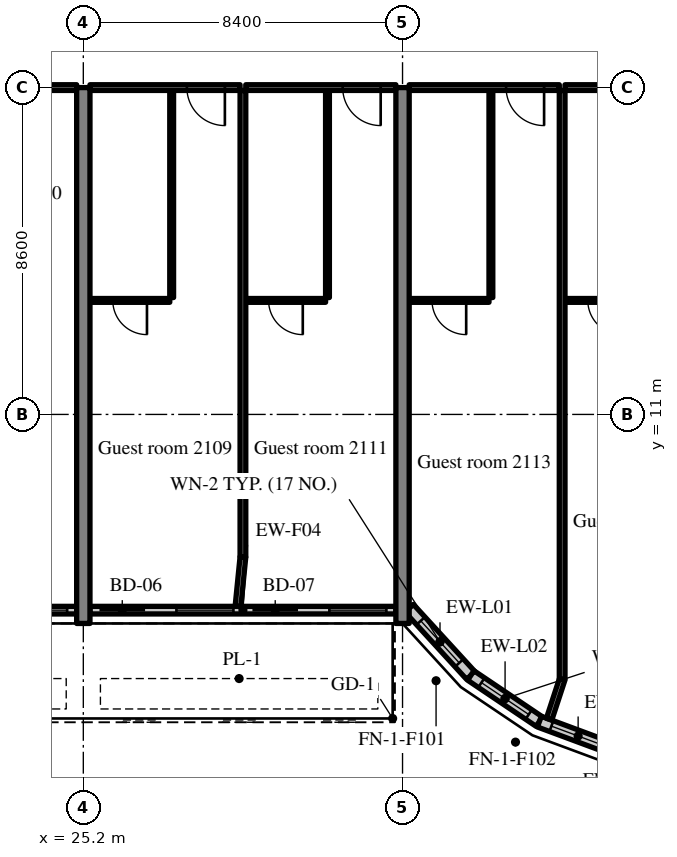
"""IFC4 building model, lengths in metres.
Left out: names, types, materials, properties, quantities, classifications, styles, units other than length and angle.
Written with IfcOpenShell. Run it as: python <this file> out.ifc"""

import sys

from ifc_helpers import new_model, si_unit, direction, frame, frame_2d, origin, place, context, subcontext, project, spatial, rectangle, extrude, source, transform, mapped, element, fill, save


model = new_model("IFC4")
c1 = context("Model", 3, precision=1e-05, world=origin(), true_north=direction((0.0, 1.0)))
c2 = subcontext(c1, "Body", "Model", "MODEL_VIEW")
j1 = project(units=[si_unit("LENGTHUNIT", "METRE"), si_unit("PLANEANGLEUNIT", "RADIAN")], contexts=[c1])
p1 = place(None, origin())
s1 = spatial("IfcSite", under=j1, at=p1, CompositionType="ELEMENT")
p2 = place(p1, origin())
s2 = spatial("IfcBuilding", under=s1, at=p2, CompositionType="ELEMENT")
p3 = place(p2, frame((0.0, 0.0, 91.4)))
s3 = spatial("IfcBuildingStorey", under=s2, at=p3, CompositionType="ELEMENT", Elevation=91.4)
m1 = source(origin(), c2, "Body", "SweptSolid", [
    extrude(rectangle(XDim=14.1, YDim=0.35, at=frame_2d((7.05, 0.0))), origin(), (0.0, 0.0, 1.0), 3.52),
])
for number, where, z_axis, x_axis in (
    (1, (25.2, 5.5, 0.0), (0.0, 0.0, 1.0), (0.0, 1.0, 0.0)),
    (2, (33.6, 5.5, 0.0), (0.0, 0.0, 1.0), (0.0, 1.0, 0.0)),
):
    element("IfcWall", number, at=place(p3, frame(where, z_axis=z_axis, x_axis=x_axis)), inside=s3, PredefinedType="SHEAR", context=c2, shape_type="MappedRepresentation", body=[
        mapped(m1, transform((0.0, 0.0, 0.0), scale=1.0)),
    ])
m2 = source(origin(), c2, "Body", "SweptSolid", [
    extrude(rectangle(XDim=8.05, YDim=0.2, at=frame_2d((4.025, 0.0))), origin(), (0.0, 0.0, 1.0), 2.82),
])
p4 = place(p3, frame((16.975, 5.85, 0.0), z_axis=(0.0, 0.0, 1.0), x_axis=(1.0, 0.0, 0.0)))
e3 = element("IfcWall", 3, at=p4, inside=s3, PredefinedType="SOLIDWALL", context=c2, shape_type="MappedRepresentation", body=[
    mapped(m2, transform((0.0, 0.0, 0.0), scale=1.0)),
])
m3 = source(origin(), c2, "Body", "SweptSolid", [
    extrude(rectangle(XDim=1.2, YDim=2.4, at=frame_2d((0.6, 1.2))), frame((0.0, 0.11, 0.0), z_axis=(0.0, -1.0, 0.0), x_axis=(1.0, 0.0, 0.0)), (0.0, 0.0, 1.0), 0.22),
])
p5 = place(p4, frame((0.25, 0.0, 0.0)))
e4 = element("IfcOpeningElement", 4, at=p5, cuts=e3, PredefinedType="OPENING", context=c2, shape_type="MappedRepresentation", body=[
    mapped(m3, transform((0.0, 0.0, 0.0), scale=1.0)),
])
m4 = source(origin(), c2, "Body", "SweptSolid", [
    extrude(rectangle(XDim=1.5, YDim=1.5, at=frame_2d((0.75, 0.75))), frame((0.0, 0.11, 0.0), z_axis=(0.0, -1.0, 0.0), x_axis=(1.0, 0.0, 0.0)), (0.0, 0.0, 1.0), 0.22),
])
p6 = place(p4, frame((2.275, 0.0, 0.9)))
e5 = element("IfcOpeningElement", 5, at=p6, cuts=e3, PredefinedType="OPENING", context=c2, shape_type="MappedRepresentation", body=[
    mapped(m4, transform((0.0, 0.0, 0.0), scale=1.0)),
])
p7 = place(p4, frame((4.275, 0.0, 0.0)))
e6 = element("IfcOpeningElement", 6, at=p7, cuts=e3, PredefinedType="OPENING", context=c2, shape_type="MappedRepresentation", body=[
    mapped(m3, transform((0.0, 0.0, 0.0), scale=1.0)),
])
p8 = place(p4, frame((6.3, 0.0, 0.9)))
e7 = element("IfcOpeningElement", 7, at=p8, cuts=e3, PredefinedType="OPENING", context=c2, shape_type="MappedRepresentation", body=[
    mapped(m4, transform((0.0, 0.0, 0.0), scale=1.0)),
])
m5 = source(origin(), c2, "Body", "SweptSolid", [
    extrude(rectangle(XDim=8.05, YDim=0.2, at=frame_2d((4.025, 0.0))), origin(), (0.0, 0.0, 1.0), 2.82),
])
p9 = place(p3, frame((25.375, 5.85, 0.0), z_axis=(0.0, 0.0, 1.0), x_axis=(1.0, 0.0, 0.0)))
e8 = element("IfcWall", 8, at=p9, inside=s3, PredefinedType="SOLIDWALL", context=c2, shape_type="MappedRepresentation", body=[
    mapped(m5, transform((0.0, 0.0, 0.0), scale=1.0)),
])
p10 = place(p9, frame((0.25, 0.0, 0.0)))
e9 = element("IfcOpeningElement", 9, at=p10, cuts=e8, PredefinedType="OPENING", context=c2, shape_type="MappedRepresentation", body=[
    mapped(m3, transform((0.0, 0.0, 0.0), scale=1.0)),
])
p11 = place(p9, frame((2.275, 0.0, 0.9)))
e10 = element("IfcOpeningElement", 10, at=p11, cuts=e8, PredefinedType="OPENING", context=c2, shape_type="MappedRepresentation", body=[
    mapped(m4, transform((0.0, 0.0, 0.0), scale=1.0)),
])
p12 = place(p9, frame((4.275, 0.0, 0.0)))
e11 = element("IfcOpeningElement", 11, at=p12, cuts=e8, PredefinedType="OPENING", context=c2, shape_type="MappedRepresentation", body=[
    mapped(m3, transform((0.0, 0.0, 0.0), scale=1.0)),
])
p13 = place(p9, frame((6.3, 0.0, 0.9)))
e12 = element("IfcOpeningElement", 12, at=p13, cuts=e8, PredefinedType="OPENING", context=c2, shape_type="MappedRepresentation", body=[
    mapped(m4, transform((0.0, 0.0, 0.0), scale=1.0)),
])
m6 = source(origin(), c2, "Body", "SweptSolid", [
    extrude(rectangle(XDim=2.398, YDim=0.3, at=frame_2d((1.199, 0.0))), origin(), (0.0, 0.0, 1.0), 3.52),
])
p14 = place(p3, frame((33.776, 5.9, 0.0), z_axis=(0.0, 0.0, 1.0), x_axis=(0.675374189419, -0.737475222815, 0.0)))
e13 = element("IfcWall", 13, at=p14, inside=s3, PredefinedType="SOLIDWALL", context=c2, shape_type="MappedRepresentation", body=[
    mapped(m6, transform((0.0, 0.0, 0.0), scale=1.0)),
])
m7 = source(origin(), c2, "Body", "SweptSolid", [
    extrude(rectangle(XDim=1.5, YDim=2.0, at=frame_2d((0.75, 1.0))), frame((0.0, 0.16, 0.0), z_axis=(0.0, -1.0, 0.0), x_axis=(1.0, 0.0, 0.0)), (0.0, 0.0, 1.0), 0.32),
])
p15 = place(p14, frame((0.449, 0.0, 0.9)))
e14 = element("IfcOpeningElement", 14, at=p15, cuts=e13, PredefinedType="OPENING", context=c2, shape_type="MappedRepresentation", body=[
    mapped(m7, transform((0.0, 0.0, 0.0), scale=1.0)),
])
m8 = source(origin(), c2, "Body", "SweptSolid", [
    extrude(rectangle(XDim=2.176, YDim=0.3, at=frame_2d((1.088, 0.0))), origin(), (0.0, 0.0, 1.0), 3.52),
])
p16 = place(p3, frame((35.396, 4.131, 0.0), z_axis=(0.0, 0.0, 1.0), x_axis=(0.829590746428, -0.558371913192, 0.0)))
e15 = element("IfcWall", 15, at=p16, inside=s3, PredefinedType="SOLIDWALL", context=c2, shape_type="MappedRepresentation", body=[
    mapped(m8, transform((0.0, 0.0, 0.0), scale=1.0)),
])
p17 = place(p16, frame((0.338, 0.0, 0.9)))
e16 = element("IfcOpeningElement", 16, at=p17, cuts=e15, PredefinedType="OPENING", context=c2, shape_type="MappedRepresentation", body=[
    mapped(m7, transform((0.0, 0.0, 0.0), scale=1.0)),
])
p18 = place(p3, frame((37.201, 2.917, 0.0), z_axis=(0.0, 0.0, 1.0), x_axis=(0.93754555999, -0.347862505801, 0.0)))
e17 = element("IfcWall", 17, at=p18, inside=s3, PredefinedType="SOLIDWALL", context=c2, shape_type="MappedRepresentation", body=[
    mapped(m8, transform((0.0, 0.0, 0.0), scale=1.0)),
])
p19 = place(p18, frame((0.338, 0.0, 0.9)))
e18 = element("IfcOpeningElement", 18, at=p19, cuts=e17, PredefinedType="OPENING", context=c2, shape_type="MappedRepresentation", body=[
    mapped(m7, transform((0.0, 0.0, 0.0), scale=1.0)),
])
m9 = source(origin(), c2, "Body", "SweptSolid", [
    extrude(rectangle(XDim=8.05, YDim=0.15, at=frame_2d((4.025, 0.0))), origin(), (0.0, 0.0, 1.0), 2.82),
])
p20 = place(p3, frame((16.975, 19.6, 0.0), z_axis=(0.0, 0.0, 1.0), x_axis=(1.0, 0.0, 0.0)))
e19 = element("IfcWall", 19, at=p20, inside=s3, PredefinedType="PARTITIONING", context=c2, shape_type="MappedRepresentation", body=[
    mapped(m9, transform((0.0, 0.0, 0.0), scale=1.0)),
])
m10 = source(origin(), c2, "Body", "SweptSolid", [
    extrude(rectangle(XDim=1.8, YDim=2.1, at=frame_2d((0.9, 1.05))), frame((0.0, 0.085, 0.0), z_axis=(0.0, -1.0, 0.0), x_axis=(1.0, 0.0, 0.0)), (0.0, 0.0, 1.0), 0.17),
])
p21 = place(p20, frame((3.125, 0.0, 0.0)))
e20 = element("IfcOpeningElement", 20, at=p21, cuts=e19, PredefinedType="OPENING", context=c2, shape_type="MappedRepresentation", body=[
    mapped(m10, transform((0.0, 0.0, 0.0), scale=1.0)),
])
m11 = source(origin(), c2, "Body", "SweptSolid", [
    extrude(rectangle(XDim=5.45, YDim=0.1, at=frame_2d((2.725, 0.0))), origin(), (0.0, 0.0, 1.0), 3.52),
])
p22 = place(p3, frame((27.525, 14.075, 0.0), z_axis=(0.0, 0.0, 1.0), x_axis=(0.0, 1.0, 0.0)))
e21 = element("IfcWall", 21, at=p22, inside=s3, PredefinedType="PARTITIONING", context=c2, shape_type="MappedRepresentation", body=[
    mapped(m11, transform((0.0, 0.0, 0.0), scale=1.0)),
])
m12 = source(origin(), c2, "Body", "SweptSolid", [
    extrude(rectangle(XDim=2.1, YDim=0.1, at=frame_2d((1.05, 0.0))), origin(), (0.0, 0.0, 1.0), 3.52),
])
p23 = place(p3, frame((25.375, 14.0, 0.0), z_axis=(0.0, 0.0, 1.0), x_axis=(1.0, 0.0, 0.0)))
e22 = element("IfcWall", 22, at=p23, inside=s3, PredefinedType="PARTITIONING", context=c2, shape_type="MappedRepresentation", body=[
    mapped(m12, transform((0.0, 0.0, 0.0), scale=1.0)),
])
m13 = source(origin(), c2, "Body", "SweptSolid", [
    extrude(rectangle(XDim=0.9, YDim=2.1, at=frame_2d((0.45, 1.05))), frame((0.0, 0.06, 0.0), z_axis=(0.0, -1.0, 0.0), x_axis=(1.0, 0.0, 0.0)), (0.0, 0.0, 1.0), 0.12),
])
p24 = place(p23, frame((0.6, 0.0, 0.0)))
e23 = element("IfcOpeningElement", 23, at=p24, cuts=e22, PredefinedType="OPENING", context=c2, shape_type="MappedRepresentation", body=[
    mapped(m13, transform((0.0, 0.0, 0.0), scale=1.0)),
])
m14 = source(origin(), c2, "Body", "SweptSolid", [
    extrude(rectangle(XDim=3.95, YDim=0.15, at=frame_2d((1.975, 0.0))), origin(), (0.0, 0.0, 1.0), 2.82),
])
p25 = place(p3, frame((25.375, 19.6, 0.0), z_axis=(0.0, 0.0, 1.0), x_axis=(1.0, 0.0, 0.0)))
e24 = element("IfcWall", 24, at=p25, inside=s3, PredefinedType="PARTITIONING", context=c2, shape_type="MappedRepresentation", body=[
    mapped(m14, transform((0.0, 0.0, 0.0), scale=1.0)),
])
m15 = source(origin(), c2, "Body", "SweptSolid", [
    extrude(rectangle(XDim=1.0, YDim=2.1, at=frame_2d((0.5, 1.05))), frame((0.0, 0.085, 0.0), z_axis=(0.0, -1.0, 0.0), x_axis=(1.0, 0.0, 0.0)), (0.0, 0.0, 1.0), 0.17),
])
p26 = place(p25, frame((2.55, 0.0, 0.0)))
e25 = element("IfcOpeningElement", 25, at=p26, cuts=e24, PredefinedType="OPENING", context=c2, shape_type="MappedRepresentation", body=[
    mapped(m15, transform((0.0, 0.0, 0.0), scale=1.0)),
])
p27 = place(p3, frame((31.625, 14.075, 0.0), z_axis=(0.0, 0.0, 1.0), x_axis=(0.0, 1.0, 0.0)))
e26 = element("IfcWall", 26, at=p27, inside=s3, PredefinedType="PARTITIONING", context=c2, shape_type="MappedRepresentation", body=[
    mapped(m11, transform((0.0, 0.0, 0.0), scale=1.0)),
])
m16 = source(origin(), c2, "Body", "SweptSolid", [
    extrude(rectangle(XDim=2.1, YDim=0.1, at=frame_2d((1.05, 0.0))), origin(), (0.0, 0.0, 1.0), 3.52),
])
p28 = place(p3, frame((29.475, 14.0, 0.0), z_axis=(0.0, 0.0, 1.0), x_axis=(1.0, 0.0, 0.0)))
e27 = element("IfcWall", 27, at=p28, inside=s3, PredefinedType="PARTITIONING", context=c2, shape_type="MappedRepresentation", body=[
    mapped(m16, transform((0.0, 0.0, 0.0), scale=1.0)),
])
p29 = place(p28, frame((0.6, 0.0, 0.0)))
e28 = element("IfcOpeningElement", 28, at=p29, cuts=e27, PredefinedType="OPENING", context=c2, shape_type="MappedRepresentation", body=[
    mapped(m13, transform((0.0, 0.0, 0.0), scale=1.0)),
])
p30 = place(p3, frame((29.475, 19.6, 0.0), z_axis=(0.0, 0.0, 1.0), x_axis=(1.0, 0.0, 0.0)))
e29 = element("IfcWall", 29, at=p30, inside=s3, PredefinedType="PARTITIONING", context=c2, shape_type="MappedRepresentation", body=[
    mapped(m14, transform((0.0, 0.0, 0.0), scale=1.0)),
])
p31 = place(p30, frame((2.55, 0.0, 0.0)))
e30 = element("IfcOpeningElement", 30, at=p31, cuts=e29, PredefinedType="OPENING", context=c2, shape_type="MappedRepresentation", body=[
    mapped(m15, transform((0.0, 0.0, 0.0), scale=1.0)),
])
m17 = source(origin(), c2, "Body", "SweptSolid", [
    extrude(rectangle(XDim=12.275, YDim=0.15, at=frame_2d((6.137, 0.0))), origin(), (0.0, 0.0, 1.0), 3.52),
])
p32 = place(p3, frame((29.4, 7.25, 0.0), z_axis=(0.0, 0.0, 1.0), x_axis=(0.0, 1.0, 0.0)))
e31 = element("IfcWall", 31, at=p32, inside=s3, PredefinedType="PARTITIONING", context=c2, shape_type="MappedRepresentation", body=[
    mapped(m17, transform((0.0, 0.0, 0.0), scale=1.0)),
])
p33 = place(p3, frame((35.925, 14.075, 0.0), z_axis=(0.0, 0.0, 1.0), x_axis=(0.0, 1.0, 0.0)))
e32 = element("IfcWall", 32, at=p33, inside=s3, PredefinedType="PARTITIONING", context=c2, shape_type="MappedRepresentation", body=[
    mapped(m11, transform((0.0, 0.0, 0.0), scale=1.0)),
])
p34 = place(p3, frame((33.775, 14.0, 0.0), z_axis=(0.0, 0.0, 1.0), x_axis=(1.0, 0.0, 0.0)))
e33 = element("IfcWall", 33, at=p34, inside=s3, PredefinedType="PARTITIONING", context=c2, shape_type="MappedRepresentation", body=[
    mapped(m12, transform((0.0, 0.0, 0.0), scale=1.0)),
])
p35 = place(p34, frame((0.6, 0.0, 0.0)))
e34 = element("IfcOpeningElement", 34, at=p35, cuts=e33, PredefinedType="OPENING", context=c2, shape_type="MappedRepresentation", body=[
    mapped(m13, transform((0.0, 0.0, 0.0), scale=1.0)),
])
m18 = source(origin(), c2, "Body", "SweptSolid", [
    extrude(rectangle(XDim=3.95, YDim=0.15, at=frame_2d((1.975, 0.0))), origin(), (0.0, 0.0, 1.0), 2.82),
])
p36 = place(p3, frame((33.775, 19.6, 0.0), z_axis=(0.0, 0.0, 1.0), x_axis=(1.0, 0.0, 0.0)))
e35 = element("IfcWall", 35, at=p36, inside=s3, PredefinedType="PARTITIONING", context=c2, shape_type="MappedRepresentation", body=[
    mapped(m18, transform((0.0, 0.0, 0.0), scale=1.0)),
])
p37 = place(p36, frame((2.55, 0.0, 0.0)))
e36 = element("IfcOpeningElement", 36, at=p37, cuts=e35, PredefinedType="OPENING", context=c2, shape_type="MappedRepresentation", body=[
    mapped(m15, transform((0.0, 0.0, 0.0), scale=1.0)),
])
p38 = place(p3, frame((37.875, 14.0, 0.0), z_axis=(0.0, 0.0, 1.0), x_axis=(1.0, 0.0, 0.0)))
e37 = element("IfcWall", 37, at=p38, inside=s3, PredefinedType="PARTITIONING", context=c2, shape_type="MappedRepresentation", body=[
    mapped(m12, transform((0.0, 0.0, 0.0), scale=1.0)),
])
p39 = place(p38, frame((0.6, 0.0, 0.0)))
e38 = element("IfcOpeningElement", 38, at=p39, cuts=e37, PredefinedType="OPENING", context=c2, shape_type="MappedRepresentation", body=[
    mapped(m13, transform((0.0, 0.0, 0.0), scale=1.0)),
])
p40 = place(p3, frame((37.875, 19.6, 0.0), z_axis=(0.0, 0.0, 1.0), x_axis=(1.0, 0.0, 0.0)))
e39 = element("IfcWall", 39, at=p40, inside=s3, PredefinedType="PARTITIONING", context=c2, shape_type="MappedRepresentation", body=[
    mapped(m14, transform((0.0, 0.0, 0.0), scale=1.0)),
])
p41 = place(p40, frame((2.55, 0.0, 0.0)))
e40 = element("IfcOpeningElement", 40, at=p41, cuts=e39, PredefinedType="OPENING", context=c2, shape_type="MappedRepresentation", body=[
    mapped(m15, transform((0.0, 0.0, 0.0), scale=1.0)),
])
m19 = source(origin(), c2, "Body", "SweptSolid", [
    extrude(rectangle(XDim=15.498, YDim=0.15, at=frame_2d((7.749, 0.0))), origin(), (0.0, 0.0, 1.0), 3.52),
])
p42 = place(p3, frame((37.8, 4.027, 0.0), z_axis=(0.0, 0.0, 1.0), x_axis=(0.0, 1.0, 0.0)))
e41 = element("IfcWall", 41, at=p42, inside=s3, PredefinedType="PARTITIONING", context=c2, shape_type="MappedRepresentation", body=[
    mapped(m19, transform((0.0, 0.0, 0.0), scale=1.0)),
])
m20 = source(origin(), c2, "Body", "SweptSolid", [
    extrude(rectangle(XDim=1.307, YDim=0.15, at=frame_2d((0.653, 0.0))), origin(), (0.0, 0.0, 1.0), 3.52),
])
p43 = place(p3, frame((29.27, 5.95, 0.0), z_axis=(0.0, 0.0, 1.0), x_axis=(0.099411212066, 0.995046436562, 0.0)))
e42 = element("IfcWall", 42, at=p43, inside=s3, PredefinedType="PARTITIONING", context=c2, shape_type="MappedRepresentation", body=[
    mapped(m20, transform((0.0, 0.0, 0.0), scale=1.0)),
])
m21 = source(origin(), c2, "Body", "SweptSolid", [
    extrude(rectangle(XDim=1.101, YDim=0.15, at=frame_2d((0.55, 0.0))), origin(), (0.0, 0.0, 1.0), 3.52),
])
p44 = place(p3, frame((37.457, 2.981, 0.0), z_axis=(0.0, 0.0, 1.0), x_axis=(0.311567081539, 0.950224159712, 0.0)))
e43 = element("IfcWall", 43, at=p44, inside=s3, PredefinedType="PARTITIONING", context=c2, shape_type="MappedRepresentation", body=[
    mapped(m21, transform((0.0, 0.0, 0.0), scale=1.0)),
])
m22 = source(origin(), c2, "Body", "SweptSolid", [
    extrude(rectangle(XDim=1.5, YDim=1.5, at=frame_2d((0.75, 0.75))), frame((0.0, 0.03, 0.0), z_axis=(0.0, -1.0, 0.0), x_axis=(1.0, 0.0, 0.0)), (0.0, 0.0, 1.0), 0.06),
])
p45 = place(p8, origin())
e44 = element("IfcWindow", 44, at=p45, inside=s3, PartitioningType="SINGLE_PANEL", PredefinedType="WINDOW", context=c2, shape_type="MappedRepresentation", body=[
    mapped(m22, transform((0.0, 0.0, 0.0), scale=1.0)),
])
fill(e7, e44)
m23 = source(origin(), c2, "Body", "SweptSolid", [
    extrude(rectangle(XDim=1.2, YDim=2.4, at=frame_2d((0.6, 1.2))), frame((0.0, 0.025, 0.0), z_axis=(0.0, -1.0, 0.0), x_axis=(1.0, 0.0, 0.0)), (0.0, 0.0, 1.0), 0.05),
])
p46 = place(p10, origin())
e45 = element("IfcDoor", 45, at=p46, inside=s3, OperationType="SLIDING_TO_RIGHT", PredefinedType="DOOR", context=c2, shape_type="MappedRepresentation", body=[
    mapped(m23, transform((0.0, 0.0, 0.0), scale=1.0)),
])
fill(e9, e45)
p47 = place(p11, origin())
e46 = element("IfcWindow", 46, at=p47, inside=s3, PartitioningType="SINGLE_PANEL", PredefinedType="WINDOW", context=c2, shape_type="MappedRepresentation", body=[
    mapped(m22, transform((0.0, 0.0, 0.0), scale=1.0)),
])
fill(e10, e46)
p48 = place(p12, origin())
e47 = element("IfcDoor", 47, at=p48, inside=s3, OperationType="SLIDING_TO_LEFT", PredefinedType="DOOR", context=c2, shape_type="MappedRepresentation", body=[
    mapped(m23, transform((0.0, 0.0, 0.0), scale=1.0)),
])
fill(e11, e47)
p49 = place(p13, origin())
e48 = element("IfcWindow", 48, at=p49, inside=s3, PartitioningType="SINGLE_PANEL", PredefinedType="WINDOW", context=c2, shape_type="MappedRepresentation", body=[
    mapped(m22, transform((0.0, 0.0, 0.0), scale=1.0)),
])
fill(e12, e48)
m24 = source(origin(), c2, "Body", "SweptSolid", [
    extrude(rectangle(XDim=1.5, YDim=2.0, at=frame_2d((0.75, 1.0))), frame((0.0, 0.03, 0.0), z_axis=(0.0, -1.0, 0.0), x_axis=(1.0, 0.0, 0.0)), (0.0, 0.0, 1.0), 0.06),
])
p50 = place(p15, origin())
e49 = element("IfcWindow", 49, at=p50, inside=s3, PartitioningType="SINGLE_PANEL", PredefinedType="WINDOW", context=c2, shape_type="MappedRepresentation", body=[
    mapped(m24, transform((0.0, 0.0, 0.0), scale=1.0)),
])
fill(e14, e49)
p51 = place(p17, origin())
e50 = element("IfcWindow", 50, at=p51, inside=s3, PartitioningType="SINGLE_PANEL", PredefinedType="WINDOW", context=c2, shape_type="MappedRepresentation", body=[
    mapped(m24, transform((0.0, 0.0, 0.0), scale=1.0)),
])
fill(e16, e50)
p52 = place(p19, origin())
e51 = element("IfcWindow", 51, at=p52, inside=s3, PartitioningType="SINGLE_PANEL", PredefinedType="WINDOW", context=c2, shape_type="MappedRepresentation", body=[
    mapped(m24, transform((0.0, 0.0, 0.0), scale=1.0)),
])
fill(e18, e51)
m25 = source(origin(), c2, "Body", "SweptSolid", [
    extrude(rectangle(XDim=0.9, YDim=2.1, at=frame_2d((0.45, 1.05))), frame((0.0, 0.025, 0.0), z_axis=(0.0, -1.0, 0.0), x_axis=(1.0, 0.0, 0.0)), (0.0, 0.0, 1.0), 0.05),
])
p53 = place(p24, origin())
e52 = element("IfcDoor", 52, at=p53, inside=s3, OperationType="SINGLE_SWING_RIGHT", PredefinedType="DOOR", context=c2, shape_type="MappedRepresentation", body=[
    mapped(m25, transform((0.0, 0.0, 0.0), scale=1.0)),
])
fill(e23, e52)
m26 = source(origin(), c2, "Body", "SweptSolid", [
    extrude(rectangle(XDim=1.0, YDim=2.1, at=frame_2d((0.5, 1.05))), frame((0.0, 0.025, 0.0), z_axis=(0.0, -1.0, 0.0), x_axis=(1.0, 0.0, 0.0)), (0.0, 0.0, 1.0), 0.05),
])
p54 = place(p26, origin())
e53 = element("IfcDoor", 53, at=p54, inside=s3, OperationType="SINGLE_SWING_RIGHT", PredefinedType="DOOR", context=c2, shape_type="MappedRepresentation", body=[
    mapped(m26, transform((0.0, 0.0, 0.0), scale=1.0)),
])
fill(e25, e53)
p55 = place(p29, origin())
e54 = element("IfcDoor", 54, at=p55, inside=s3, OperationType="SINGLE_SWING_RIGHT", PredefinedType="DOOR", context=c2, shape_type="MappedRepresentation", body=[
    mapped(m25, transform((0.0, 0.0, 0.0), scale=1.0)),
])
fill(e28, e54)
p56 = place(p31, origin())
e55 = element("IfcDoor", 55, at=p56, inside=s3, OperationType="SINGLE_SWING_RIGHT", PredefinedType="DOOR", context=c2, shape_type="MappedRepresentation", body=[
    mapped(m26, transform((0.0, 0.0, 0.0), scale=1.0)),
])
fill(e30, e55)
p57 = place(p35, origin())
e56 = element("IfcDoor", 56, at=p57, inside=s3, OperationType="SINGLE_SWING_RIGHT", PredefinedType="DOOR", context=c2, shape_type="MappedRepresentation", body=[
    mapped(m25, transform((0.0, 0.0, 0.0), scale=1.0)),
])
fill(e34, e56)
p58 = place(p37, origin())
e57 = element("IfcDoor", 57, at=p58, inside=s3, OperationType="SINGLE_SWING_RIGHT", PredefinedType="DOOR", context=c2, shape_type="MappedRepresentation", body=[
    mapped(m26, transform((0.0, 0.0, 0.0), scale=1.0)),
])
fill(e36, e57)
p59 = place(p39, origin())
e58 = element("IfcDoor", 58, at=p59, inside=s3, OperationType="SINGLE_SWING_RIGHT", PredefinedType="DOOR", context=c2, shape_type="MappedRepresentation", body=[
    mapped(m25, transform((0.0, 0.0, 0.0), scale=1.0)),
])
fill(e38, e58)
save(model, sys.argv[1])
